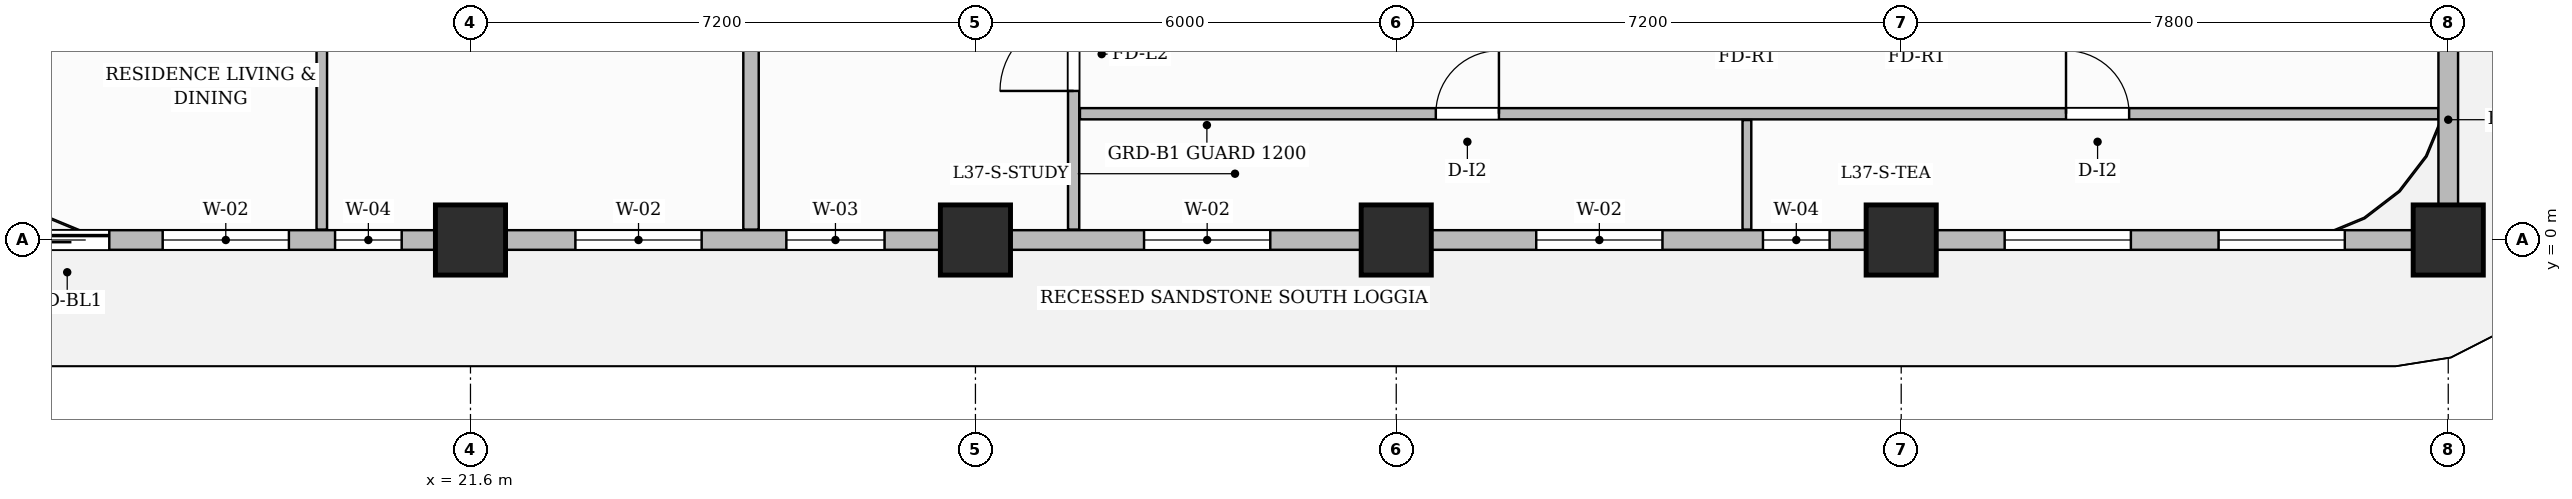
"""IFC4 building model, lengths in metres.
Left out: names, types, materials, properties, quantities, classifications, styles, units other than length and angle.
Written with IfcOpenShell. Run it as: python <this file> out.ifc"""

import sys

from ifc_helpers import new_model, si_unit, direction, frame, frame_2d, origin, origin_2d, place, context, subcontext, project, spatial, rectangle, extrude, source, transform, mapped, element, fill, save


model = new_model("IFC4")
c1 = context("Model", 3, precision=1e-05, world=origin(), true_north=direction((0.0, 1.0)))
c2 = subcontext(c1, "Body", "Model", "MODEL_VIEW")
j1 = project(units=[si_unit("LENGTHUNIT", "METRE"), si_unit("PLANEANGLEUNIT", "RADIAN")], contexts=[c1])
p1 = place(None, origin())
s1 = spatial("IfcSite", under=j1, at=p1, CompositionType="ELEMENT")
p2 = place(p1, origin())
s2 = spatial("IfcBuilding", under=s1, at=p2, CompositionType="ELEMENT")
p3 = place(p2, frame((0.0, 0.0, 150.3)))
s3 = spatial("IfcBuildingStorey", under=s2, at=p3, CompositionType="ELEMENT", Elevation=150.3)
m1 = source(origin(), c2, "Body", "SweptSolid", [
    extrude(rectangle(XDim=1.0, YDim=1.0, at=origin_2d()), origin(), (0.0, 0.0, 1.0), 3.85),
])
for number, where, z_axis, x_axis in (
    (1, (21.6, 0.0, 0.0), (0.0, 0.0, 1.0), (1.0, 0.0, 0.0)),
    (2, (28.8, 0.0, 0.0), (0.0, 0.0, 1.0), (1.0, 0.0, 0.0)),
    (3, (34.8, 0.0, 0.0), (0.0, 0.0, 1.0), (1.0, 0.0, 0.0)),
    (4, (42.0, 0.0, 0.0), (0.0, 0.0, 1.0), (1.0, 0.0, 0.0)),
    (5, (49.8, 0.0, 0.0), (0.0, 0.0, 1.0), (1.0, 0.0, 0.0)),
):
    element("IfcColumn", number, at=place(p3, frame(where, z_axis=z_axis, x_axis=x_axis)), inside=s3, PredefinedType="COLUMN", context=c2, shape_type="MappedRepresentation", body=[
        mapped(m1, transform((0.0, 0.0, 0.0), scale=1.0)),
    ])
p4 = place(p3, frame((30.2, 0.148, 0.0), z_axis=(0.0, 0.0, 1.0), x_axis=(0.0, 1.0, 0.0)))
e6 = element("IfcWall", 6, at=p4, inside=s3, PredefinedType="PARTITIONING", context=c2, shape_type="SweptSolid", body=[
    extrude(rectangle(XDim=9.712, YDim=0.16, at=frame_2d((4.856, 0.0))), origin(), (0.0, 0.0, 1.0), 3.6),
])
p5 = place(p4, frame((1.977, 0.0, 0.0)))
e7 = element("IfcOpeningElement", 7, at=p5, cuts=e6, PredefinedType="OPENING", context=c2, shape_type="SweptSolid", body=[
    extrude(rectangle(XDim=1.05, YDim=2.15, at=frame_2d((0.525, 1.075))), frame((0.0, 0.09, 0.0), z_axis=(0.0, -1.0, 0.0), x_axis=(1.0, 0.0, 0.0)), (0.0, 0.0, 1.0), 0.18),
])
p6 = place(p3, frame((30.29, 1.8, 0.0), z_axis=(0.0, 0.0, 1.0), x_axis=(1.0, 0.0, 0.0)))
e8 = element("IfcWall", 8, at=p6, inside=s3, PredefinedType="PARTITIONING", context=c2, shape_type="SweptSolid", body=[
    extrude(rectangle(XDim=19.37, YDim=0.16, at=frame_2d((9.685, 0.0))), origin(), (0.0, 0.0, 1.0), 3.6),
])
p7 = place(p6, frame((5.074, 0.0, 0.0)))
e9 = element("IfcOpeningElement", 9, at=p7, cuts=e8, PredefinedType="OPENING", context=c2, shape_type="SweptSolid", body=[
    extrude(rectangle(XDim=0.9, YDim=2.15, at=frame_2d((0.45, 1.075))), frame((0.0, 0.09, 0.0), z_axis=(0.0, -1.0, 0.0), x_axis=(1.0, 0.0, 0.0)), (0.0, 0.0, 1.0), 0.18),
])
p8 = place(p6, frame((14.06, 0.0, 0.0)))
e10 = element("IfcOpeningElement", 10, at=p8, cuts=e8, PredefinedType="OPENING", context=c2, shape_type="SweptSolid", body=[
    extrude(rectangle(XDim=0.9, YDim=2.15, at=frame_2d((0.45, 1.075))), frame((0.0, 0.09, 0.0), z_axis=(0.0, -1.0, 0.0), x_axis=(1.0, 0.0, 0.0)), (0.0, 0.0, 1.0), 0.18),
])
p9 = place(p3, frame((39.8, 0.148, 0.0), z_axis=(0.0, 0.0, 1.0), x_axis=(0.0, 1.0, 0.0)))
e11 = element("IfcWall", 11, at=p9, inside=s3, PredefinedType="PARTITIONING", context=c2, shape_type="SweptSolid", body=[
    extrude(rectangle(XDim=1.562, YDim=0.125, at=frame_2d((0.781, 0.0))), origin(), (0.0, 0.0, 1.0), 3.6),
])
p10 = place(p3, frame((25.6, 0.148, 0.0), z_axis=(0.0, 0.0, 1.0), x_axis=(0.0, 1.0, 0.0)))
e12 = element("IfcWall", 12, at=p10, inside=s3, PredefinedType="PARTITIONING", context=c2, shape_type="SweptSolid", body=[
    extrude(rectangle(XDim=9.712, YDim=0.22, at=frame_2d((4.856, 0.0))), origin(), (0.0, 0.0, 1.0), 3.6),
])
p11 = place(p3, frame((19.48, 0.148, 0.0), z_axis=(0.0, 0.0, 1.0), x_axis=(0.0, 1.0, 0.0)))
e13 = element("IfcWall", 13, at=p11, inside=s3, PredefinedType="PARTITIONING", context=c2, shape_type="SweptSolid", body=[
    extrude(rectangle(XDim=9.712, YDim=0.15, at=frame_2d((4.856, 0.0))), origin(), (0.0, 0.0, 1.0), 3.6),
])
p12 = place(p11, frame((8.277, 0.0, 0.0)))
e14 = element("IfcOpeningElement", 14, at=p12, cuts=e13, PredefinedType="OPENING", context=c2, shape_type="SweptSolid", body=[
    extrude(rectangle(XDim=0.9, YDim=2.15, at=frame_2d((0.45, 1.075))), frame((0.0, 0.085, 0.0), z_axis=(0.0, -1.0, 0.0), x_axis=(1.0, 0.0, 0.0)), (0.0, 0.0, 1.0), 0.17),
])
p13 = place(p3, frame((14.4, 0.0, 0.0), z_axis=(0.0, 0.0, 1.0), x_axis=(1.0, 0.0, 0.0)))
e15 = element("IfcWall", 15, at=p13, inside=s3, PredefinedType="SOLIDWALL", context=c2, shape_type="SweptSolid", body=[
    extrude(rectangle(XDim=35.4, YDim=0.28, at=frame_2d((17.7, 0.0))), origin(), (0.0, 0.0, 1.0), 3.085),
])
p14 = place(p13, frame((0.85, 0.0, 0.0)))
e16 = element("IfcOpeningElement", 16, at=p14, cuts=e15, PredefinedType="OPENING", context=c2, shape_type="SweptSolid", body=[
    extrude(rectangle(XDim=1.2, YDim=2.2, at=frame_2d((0.6, 1.1))), frame((0.0, 0.15, 0.0), z_axis=(0.0, -1.0, 0.0), x_axis=(1.0, 0.0, 0.0)), (0.0, 0.0, 1.0), 0.3),
])
p15 = place(p13, frame((2.811, 0.0, 0.8)))
e17 = element("IfcOpeningElement", 17, at=p15, cuts=e15, PredefinedType="OPENING", context=c2, shape_type="SweptSolid", body=[
    extrude(rectangle(XDim=1.8, YDim=1.85, at=frame_2d((0.9, 0.925))), frame((0.0, 0.15, 0.0), z_axis=(0.0, -1.0, 0.0), x_axis=(1.0, 0.0, 0.0)), (0.0, 0.0, 1.0), 0.3),
])
p16 = place(p13, frame((5.269, 0.0, 0.8)))
e18 = element("IfcOpeningElement", 18, at=p16, cuts=e15, PredefinedType="OPENING", context=c2, shape_type="SweptSolid", body=[
    extrude(rectangle(XDim=0.95, YDim=1.75, at=frame_2d((0.475, 0.875))), frame((0.0, 0.15, 0.0), z_axis=(0.0, -1.0, 0.0), x_axis=(1.0, 0.0, 0.0)), (0.0, 0.0, 1.0), 0.3),
])
p17 = place(p13, frame((8.696, 0.0, 0.8)))
e19 = element("IfcOpeningElement", 19, at=p17, cuts=e15, PredefinedType="OPENING", context=c2, shape_type="SweptSolid", body=[
    extrude(rectangle(XDim=1.8, YDim=1.85, at=frame_2d((0.9, 0.925))), frame((0.0, 0.15, 0.0), z_axis=(0.0, -1.0, 0.0), x_axis=(1.0, 0.0, 0.0)), (0.0, 0.0, 1.0), 0.3),
])
p18 = place(p13, frame((11.704, 0.0, 0.8)))
e20 = element("IfcOpeningElement", 20, at=p18, cuts=e15, PredefinedType="OPENING", context=c2, shape_type="SweptSolid", body=[
    extrude(rectangle(XDim=1.4, YDim=1.85, at=frame_2d((0.7, 0.925))), frame((0.0, 0.15, 0.0), z_axis=(0.0, -1.0, 0.0), x_axis=(1.0, 0.0, 0.0)), (0.0, 0.0, 1.0), 0.3),
])
p19 = place(p13, frame((16.804, 0.0, 0.8)))
e21 = element("IfcOpeningElement", 21, at=p19, cuts=e15, PredefinedType="OPENING", context=c2, shape_type="SweptSolid", body=[
    extrude(rectangle(XDim=1.8, YDim=1.85, at=frame_2d((0.9, 0.925))), frame((0.0, 0.15, 0.0), z_axis=(0.0, -1.0, 0.0), x_axis=(1.0, 0.0, 0.0)), (0.0, 0.0, 1.0), 0.3),
])
p20 = place(p13, frame((22.396, 0.0, 0.8)))
e22 = element("IfcOpeningElement", 22, at=p20, cuts=e15, PredefinedType="OPENING", context=c2, shape_type="SweptSolid", body=[
    extrude(rectangle(XDim=1.8, YDim=1.85, at=frame_2d((0.9, 0.925))), frame((0.0, 0.15, 0.0), z_axis=(0.0, -1.0, 0.0), x_axis=(1.0, 0.0, 0.0)), (0.0, 0.0, 1.0), 0.3),
])
p21 = place(p13, frame((25.629, 0.0, 0.8)))
e23 = element("IfcOpeningElement", 23, at=p21, cuts=e15, PredefinedType="OPENING", context=c2, shape_type="SweptSolid", body=[
    extrude(rectangle(XDim=0.95, YDim=1.75, at=frame_2d((0.475, 0.875))), frame((0.0, 0.15, 0.0), z_axis=(0.0, -1.0, 0.0), x_axis=(1.0, 0.0, 0.0)), (0.0, 0.0, 1.0), 0.3),
])
p22 = place(p13, frame((29.075, 0.0, 0.8)))
e24 = element("IfcOpeningElement", 24, at=p22, cuts=e15, PredefinedType="OPENING", context=c2, shape_type="SweptSolid", body=[
    extrude(rectangle(XDim=1.8, YDim=1.85, at=frame_2d((0.9, 0.925))), frame((0.0, 0.15, 0.0), z_axis=(0.0, -1.0, 0.0), x_axis=(1.0, 0.0, 0.0)), (0.0, 0.0, 1.0), 0.3),
])
p23 = place(p13, frame((32.125, 0.0, 0.8)))
e25 = element("IfcOpeningElement", 25, at=p23, cuts=e15, PredefinedType="OPENING", context=c2, shape_type="SweptSolid", body=[
    extrude(rectangle(XDim=1.8, YDim=1.85, at=frame_2d((0.9, 0.925))), frame((0.0, 0.15, 0.0), z_axis=(0.0, -1.0, 0.0), x_axis=(1.0, 0.0, 0.0)), (0.0, 0.0, 1.0), 0.3),
])
p24 = place(p3, frame((49.8, 0.05, 0.0), z_axis=(0.0, 0.0, 1.0), x_axis=(0.0, 1.0, 0.0)))
e26 = element("IfcWall", 26, at=p24, inside=s3, PredefinedType="SOLIDWALL", context=c2, shape_type="SweptSolid", body=[
    extrude(rectangle(XDim=3.33, YDim=0.28, at=frame_2d((1.665, 0.0))), origin(), (0.0, 0.0, 1.0), 3.6),
])
m2 = source(origin(), c2, "Body", "SweptSolid", [
    extrude(rectangle(XDim=1.05, YDim=2.15, at=frame_2d((0.525, 1.075))), frame((0.0, 0.025, 0.0), z_axis=(0.0, -1.0, 0.0), x_axis=(1.0, 0.0, 0.0)), (0.0, 0.0, 1.0), 0.05),
])
p25 = place(p5, origin())
e27 = element("IfcDoor", 27, at=p25, inside=s3, OperationType="SINGLE_SWING_LEFT", PredefinedType="DOOR", context=c2, shape_type="MappedRepresentation", body=[
    mapped(m2, transform((0.0, 0.0, 0.0), scale=1.0)),
])
fill(e7, e27)
m3 = source(origin(), c2, "Body", "SweptSolid", [
    extrude(rectangle(XDim=0.9, YDim=2.15, at=frame_2d((0.45, 1.075))), frame((0.0, 0.025, 0.0), z_axis=(0.0, -1.0, 0.0), x_axis=(1.0, 0.0, 0.0)), (0.0, 0.0, 1.0), 0.05),
])
p26 = place(p7, origin())
e28 = element("IfcDoor", 28, at=p26, inside=s3, OperationType="SINGLE_SWING_RIGHT", PredefinedType="DOOR", context=c2, shape_type="MappedRepresentation", body=[
    mapped(m3, transform((0.0, 0.0, 0.0), scale=1.0)),
])
fill(e9, e28)
p27 = place(p8, origin())
e29 = element("IfcDoor", 29, at=p27, inside=s3, OperationType="SINGLE_SWING_LEFT", PredefinedType="DOOR", context=c2, shape_type="MappedRepresentation", body=[
    mapped(m3, transform((0.0, 0.0, 0.0), scale=1.0)),
])
fill(e10, e29)
m4 = source(origin(), c2, "Body", "SweptSolid", [
    extrude(rectangle(XDim=1.2, YDim=2.2, at=frame_2d((0.6, 1.1))), frame((0.0, 0.025, 0.0), z_axis=(0.0, -1.0, 0.0), x_axis=(1.0, 0.0, 0.0)), (0.0, 0.0, 1.0), 0.05),
])
p28 = place(p14, origin())
e30 = element("IfcDoor", 30, at=p28, inside=s3, OperationType="SLIDING_TO_LEFT", PredefinedType="DOOR", context=c2, shape_type="MappedRepresentation", body=[
    mapped(m4, transform((0.0, 0.0, 0.0), scale=1.0)),
])
fill(e16, e30)
m5 = source(origin(), c2, "Body", "SweptSolid", [
    extrude(rectangle(XDim=1.8, YDim=1.85, at=frame_2d((0.9, 0.925))), frame((0.0, 0.03, 0.0), z_axis=(0.0, -1.0, 0.0), x_axis=(1.0, 0.0, 0.0)), (0.0, 0.0, 1.0), 0.06),
])
p29 = place(p15, origin())
e31 = element("IfcWindow", 31, at=p29, inside=s3, PartitioningType="DOUBLE_PANEL_VERTICAL", PredefinedType="WINDOW", context=c2, shape_type="MappedRepresentation", body=[
    mapped(m5, transform((0.0, 0.0, 0.0), scale=1.0)),
])
fill(e17, e31)
m6 = source(origin(), c2, "Body", "SweptSolid", [
    extrude(rectangle(XDim=0.95, YDim=1.75, at=frame_2d((0.475, 0.875))), frame((0.0, 0.03, 0.0), z_axis=(0.0, -1.0, 0.0), x_axis=(1.0, 0.0, 0.0)), (0.0, 0.0, 1.0), 0.06),
])
p30 = place(p16, origin())
e32 = element("IfcWindow", 32, at=p30, inside=s3, PartitioningType="SINGLE_PANEL", PredefinedType="WINDOW", context=c2, shape_type="MappedRepresentation", body=[
    mapped(m6, transform((0.0, 0.0, 0.0), scale=1.0)),
])
fill(e18, e32)
p31 = place(p17, origin())
e33 = element("IfcWindow", 33, at=p31, inside=s3, PartitioningType="DOUBLE_PANEL_VERTICAL", PredefinedType="WINDOW", context=c2, shape_type="MappedRepresentation", body=[
    mapped(m5, transform((0.0, 0.0, 0.0), scale=1.0)),
])
fill(e19, e33)
m7 = source(origin(), c2, "Body", "SweptSolid", [
    extrude(rectangle(XDim=1.4, YDim=1.85, at=frame_2d((0.7, 0.925))), frame((0.0, 0.03, 0.0), z_axis=(0.0, -1.0, 0.0), x_axis=(1.0, 0.0, 0.0)), (0.0, 0.0, 1.0), 0.06),
])
p32 = place(p18, origin())
e34 = element("IfcWindow", 34, at=p32, inside=s3, PartitioningType="SINGLE_PANEL", PredefinedType="WINDOW", context=c2, shape_type="MappedRepresentation", body=[
    mapped(m7, transform((0.0, 0.0, 0.0), scale=1.0)),
])
fill(e20, e34)
p33 = place(p19, origin())
e35 = element("IfcWindow", 35, at=p33, inside=s3, PartitioningType="DOUBLE_PANEL_VERTICAL", PredefinedType="WINDOW", context=c2, shape_type="MappedRepresentation", body=[
    mapped(m5, transform((0.0, 0.0, 0.0), scale=1.0)),
])
fill(e21, e35)
p34 = place(p20, origin())
e36 = element("IfcWindow", 36, at=p34, inside=s3, PartitioningType="DOUBLE_PANEL_VERTICAL", PredefinedType="WINDOW", context=c2, shape_type="MappedRepresentation", body=[
    mapped(m5, transform((0.0, 0.0, 0.0), scale=1.0)),
])
fill(e22, e36)
p35 = place(p21, origin())
e37 = element("IfcWindow", 37, at=p35, inside=s3, PartitioningType="SINGLE_PANEL", PredefinedType="WINDOW", context=c2, shape_type="MappedRepresentation", body=[
    mapped(m6, transform((0.0, 0.0, 0.0), scale=1.0)),
])
fill(e23, e37)
p36 = place(p22, origin())
e38 = element("IfcWindow", 38, at=p36, inside=s3, PartitioningType="DOUBLE_PANEL_VERTICAL", PredefinedType="WINDOW", context=c2, shape_type="MappedRepresentation", body=[
    mapped(m5, transform((0.0, 0.0, 0.0), scale=1.0)),
])
fill(e24, e38)
p37 = place(p23, origin())
e39 = element("IfcWindow", 39, at=p37, inside=s3, PartitioningType="DOUBLE_PANEL_VERTICAL", PredefinedType="WINDOW", context=c2, shape_type="MappedRepresentation", body=[
    mapped(m5, transform((0.0, 0.0, 0.0), scale=1.0)),
])
fill(e25, e39)
save(model, sys.argv[1])
